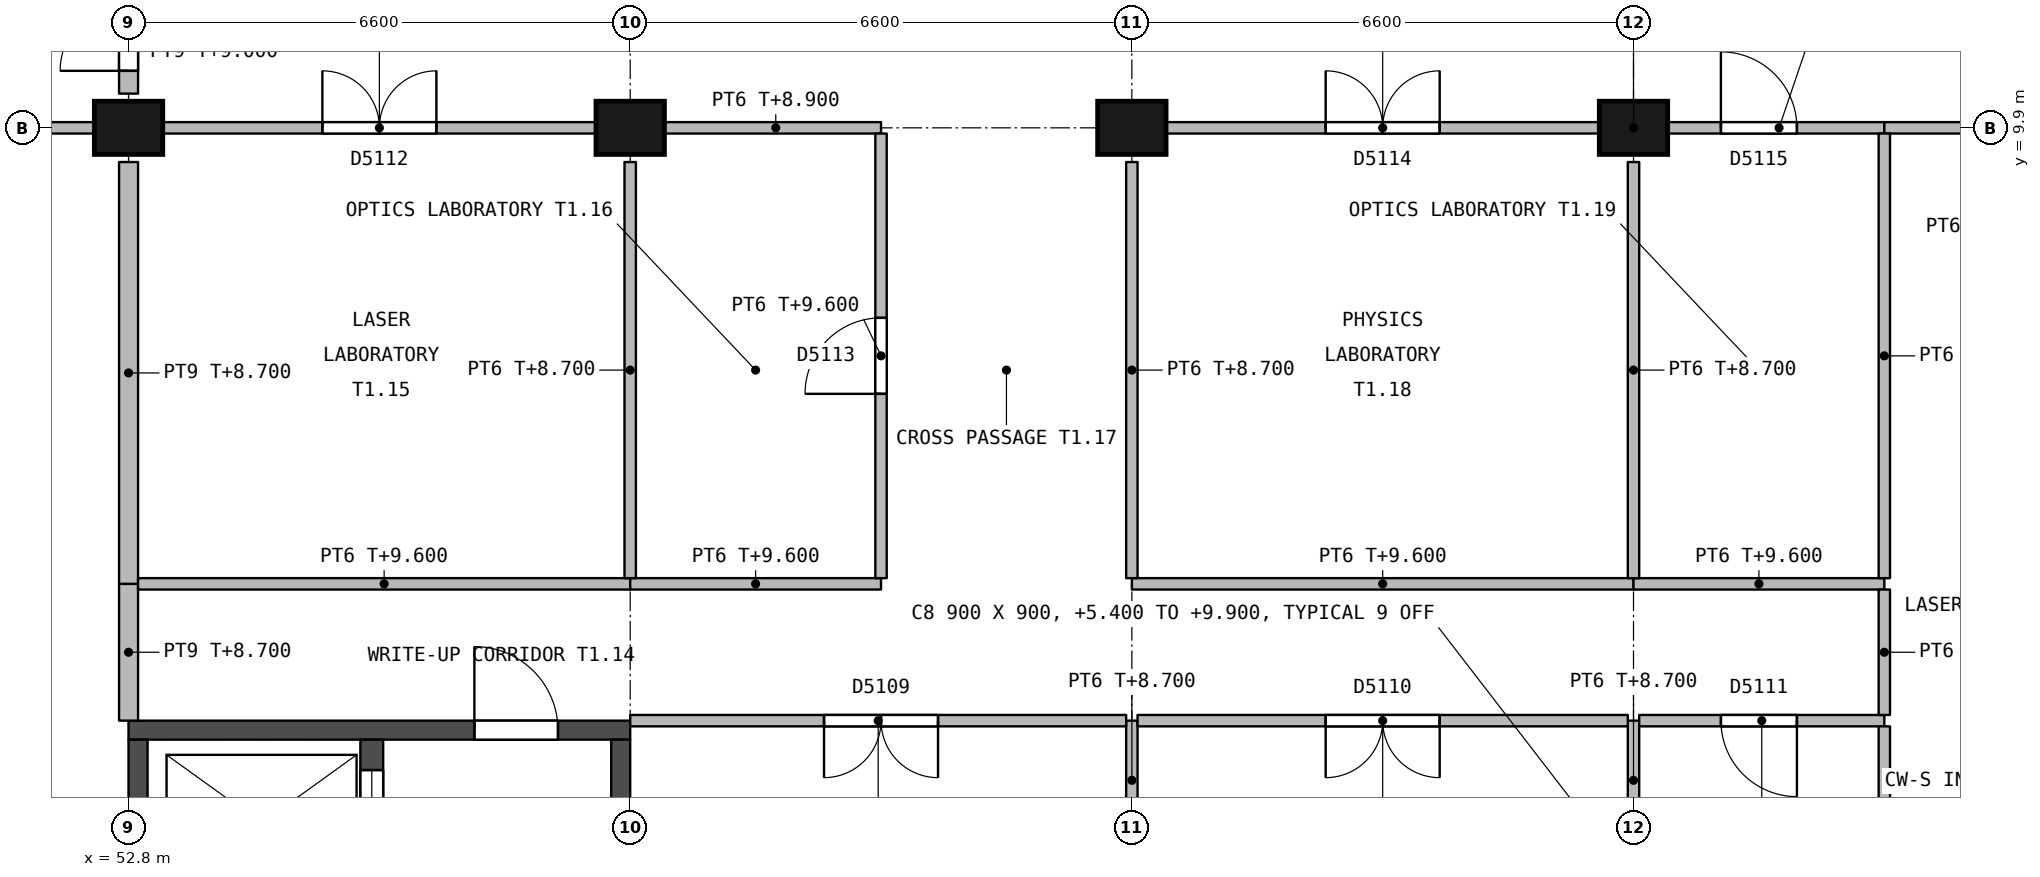
"""IFC4 building model, lengths in metres.
Left out: names, types, materials, properties, quantities, classifications, styles, units other than length and angle.
Written with IfcOpenShell. Run it as: python <this file> out.ifc"""

import sys

from ifc_helpers import new_model, si_unit, direction, frame, frame_2d, origin, origin_2d, place, context, subcontext, project, spatial, rectangle, extrude, element, fill, save


model = new_model("IFC4")
c1 = context("Model", 3, precision=1e-05, world=origin(), true_north=direction((0.0, 1.0)))
c2 = subcontext(c1, "Body", "Model", "MODEL_VIEW")
j1 = project(units=[si_unit("LENGTHUNIT", "METRE"), si_unit("PLANEANGLEUNIT", "RADIAN")], contexts=[c1])
p1 = place(None, origin())
s1 = spatial("IfcSite", under=j1, at=p1, CompositionType="ELEMENT")
p2 = place(p1, origin())
s2 = spatial("IfcBuilding", under=s1, at=p2, CompositionType="ELEMENT")
p3 = place(p2, frame((0.0, 0.0, 5.4)))
s3 = spatial("IfcBuildingStorey", under=s2, at=p3, CompositionType="ELEMENT", Elevation=5.4)
for number, where, z_axis, x_axis in (
    (1, (52.8, 9.9, 0.0), (0.0, 0.0, 1.0), (1.0, 0.0, 0.0)),
    (2, (59.4, 9.9, 0.0), (0.0, 0.0, 1.0), (1.0, 0.0, 0.0)),
    (3, (66.0, 9.9, 0.0), (0.0, 0.0, 1.0), (1.0, 0.0, 0.0)),
    (4, (72.6, 9.9, 0.0), (0.0, 0.0, 1.0), (1.0, 0.0, 0.0)),
):
    element("IfcColumn", number, at=place(p3, frame(where, z_axis=z_axis, x_axis=x_axis)), inside=s3, PredefinedType="COLUMN", context=c2, shape_type="SweptSolid", body=[
        extrude(rectangle(XDim=0.9, YDim=0.7, at=origin_2d()), origin(), (0.0, 0.0, 1.0), 4.5),
    ])
p4 = place(p3, frame((59.4, 1.975, 0.0), z_axis=(0.0, 0.0, 1.0), x_axis=(-1.0, 0.0, 0.0)))
e5 = element("IfcWall", 5, at=p4, inside=s3, PredefinedType="SHEAR", context=c2, shape_type="SweptSolid", body=[
    extrude(rectangle(XDim=6.6, YDim=0.25, at=frame_2d((3.3, 0.0))), origin(), (0.0, 0.0, 1.0), 4.2),
])
p5 = place(p4, frame((0.95, 0.0, 0.0)))
e6 = element("IfcOpeningElement", 6, at=p5, cuts=e5, PredefinedType="OPENING", context=c2, shape_type="SweptSolid", body=[
    extrude(rectangle(XDim=1.1, YDim=2.1, at=frame_2d((0.55, 1.05))), frame((0.0, 0.135, 0.0), z_axis=(0.0, -1.0, 0.0), x_axis=(1.0, 0.0, 0.0)), (0.0, 0.0, 1.0), 0.27),
])
for number, where, z_axis, x_axis in (
    (7, (59.275, 1.85, 0.0), (0.0, 0.0, 1.0), (0.0, -1.0, 0.0)),
    (8, (52.925, 1.85, 0.0), (0.0, 0.0, 1.0), (0.0, -1.0, 0.0)),
):
    element("IfcWall", number, at=place(p3, frame(where, z_axis=z_axis, x_axis=x_axis)), inside=s3, PredefinedType="SHEAR", context=c2, shape_type="SweptSolid", body=[
        extrude(rectangle(XDim=9.4, YDim=0.25, at=frame_2d((4.7, 0.0))), origin(), (0.0, 0.0, 1.0), 4.2),
    ])
p6 = place(p3, frame((56.0, 1.85, 0.0), z_axis=(0.0, 0.0, 1.0), x_axis=(0.0, -1.0, 0.0)))
e9 = element("IfcWall", 9, at=p6, inside=s3, PredefinedType="SHEAR", context=c2, shape_type="SweptSolid", body=[
    extrude(rectangle(XDim=6.35, YDim=0.3, at=frame_2d((3.175, 0.0))), origin(), (0.0, 0.0, 1.0), 4.2),
])
p7 = place(p6, frame((3.925, 0.0, 0.0)))
e10 = element("IfcOpeningElement", 10, at=p7, cuts=e9, PredefinedType="OPENING", context=c2, shape_type="SweptSolid", body=[
    extrude(rectangle(XDim=0.9, YDim=2.1, at=frame_2d((0.45, 1.05))), frame((0.0, 0.16, 0.0), z_axis=(0.0, -1.0, 0.0), x_axis=(1.0, 0.0, 0.0)), (0.0, 0.0, 1.0), 0.32),
])
p8 = place(p6, frame((0.4, 0.0, 0.0)))
e11 = element("IfcOpeningElement", 11, at=p8, cuts=e9, PredefinedType="OPENING", context=c2, shape_type="SweptSolid", body=[
    extrude(rectangle(XDim=1.4, YDim=2.4, at=frame_2d((0.7, 1.2))), frame((0.0, 0.16, 0.0), z_axis=(0.0, -1.0, 0.0), x_axis=(1.0, 0.0, 0.0)), (0.0, 0.0, 1.0), 0.32),
])
p9 = place(p3, frame((46.6, 9.9, 0.0), z_axis=(0.0, 0.0, 1.0), x_axis=(1.0, 0.0, 0.0)))
e12 = element("IfcWall", 12, at=p9, inside=s3, PredefinedType="PARTITIONING", context=c2, shape_type="SweptSolid", body=[
    extrude(rectangle(XDim=5.75, YDim=0.15, at=frame_2d((2.875, 0.0))), origin(), (0.0, 0.0, 1.0), 3.5),
])
p10 = place(p9, frame((2.15, 0.0, 0.0)))
e13 = element("IfcOpeningElement", 13, at=p10, cuts=e12, PredefinedType="OPENING", context=c2, shape_type="SweptSolid", body=[
    extrude(rectangle(XDim=1.5, YDim=2.1, at=frame_2d((0.75, 1.05))), frame((0.0, 0.085, 0.0), z_axis=(0.0, -1.0, 0.0), x_axis=(1.0, 0.0, 0.0)), (0.0, 0.0, 1.0), 0.17),
])
p11 = place(p3, frame((52.8, 10.35, 0.0), z_axis=(0.0, 0.0, 1.0), x_axis=(0.0, 1.0, 0.0)))
e14 = element("IfcWall", 14, at=p11, inside=s3, PredefinedType="PARTITIONING", context=c2, shape_type="SweptSolid", body=[
    extrude(rectangle(XDim=2.4, YDim=0.25, at=frame_2d((1.2, 0.0))), origin(), (0.0, 0.0, 1.0), 3.6),
])
p12 = place(p11, frame((0.3, 0.0, 0.0)))
e15 = element("IfcOpeningElement", 15, at=p12, cuts=e14, PredefinedType="OPENING", context=c2, shape_type="SweptSolid", body=[
    extrude(rectangle(XDim=1.8, YDim=2.1, at=frame_2d((0.9, 1.05))), frame((0.0, 0.135, 0.0), z_axis=(0.0, -1.0, 0.0), x_axis=(1.0, 0.0, 0.0)), (0.0, 0.0, 1.0), 0.27),
])
p13 = place(p3, frame((52.8, 2.1, 0.0), z_axis=(0.0, 0.0, 1.0), x_axis=(0.0, 1.0, 0.0)))
e16 = element("IfcWall", 16, at=p13, inside=s3, PredefinedType="PARTITIONING", context=c2, shape_type="SweptSolid", body=[
    extrude(rectangle(XDim=1.8, YDim=0.25, at=frame_2d((0.9, 0.0))), origin(), (0.0, 0.0, 1.0), 3.3),
])
p14 = place(p3, frame((52.8, 3.9, 0.0), z_axis=(0.0, 0.0, 1.0), x_axis=(0.0, 1.0, 0.0)))
e17 = element("IfcWall", 17, at=p14, inside=s3, PredefinedType="PARTITIONING", context=c2, shape_type="SweptSolid", body=[
    extrude(rectangle(XDim=5.55, YDim=0.25, at=frame_2d((2.775, 0.0))), origin(), (0.0, 0.0, 1.0), 3.3),
])
p15 = place(p3, frame((53.25, 9.9, 0.0), z_axis=(0.0, 0.0, 1.0), x_axis=(1.0, 0.0, 0.0)))
e18 = element("IfcWall", 18, at=p15, inside=s3, PredefinedType="PARTITIONING", context=c2, shape_type="SweptSolid", body=[
    extrude(rectangle(XDim=5.7, YDim=0.15, at=frame_2d((2.85, 0.0))), origin(), (0.0, 0.0, 1.0), 3.5),
])
p16 = place(p15, frame((2.1, 0.0, 0.0)))
e19 = element("IfcOpeningElement", 19, at=p16, cuts=e18, PredefinedType="OPENING", context=c2, shape_type="SweptSolid", body=[
    extrude(rectangle(XDim=1.5, YDim=2.1, at=frame_2d((0.75, 1.05))), frame((0.0, 0.085, 0.0), z_axis=(0.0, -1.0, 0.0), x_axis=(1.0, 0.0, 0.0)), (0.0, 0.0, 1.0), 0.17),
])
p17 = place(p3, frame((59.85, 9.9, 0.0), z_axis=(0.0, 0.0, 1.0), x_axis=(1.0, 0.0, 0.0)))
e20 = element("IfcWall", 20, at=p17, inside=s3, PredefinedType="PARTITIONING", context=c2, shape_type="SweptSolid", body=[
    extrude(rectangle(XDim=2.85, YDim=0.15, at=frame_2d((1.425, 0.0))), origin(), (0.0, 0.0, 1.0), 3.5),
])
p18 = place(p3, frame((66.45, 9.9, 0.0), z_axis=(0.0, 0.0, 1.0), x_axis=(1.0, 0.0, 0.0)))
e21 = element("IfcWall", 21, at=p18, inside=s3, PredefinedType="PARTITIONING", context=c2, shape_type="SweptSolid", body=[
    extrude(rectangle(XDim=5.7, YDim=0.15, at=frame_2d((2.85, 0.0))), origin(), (0.0, 0.0, 1.0), 3.5),
])
p19 = place(p18, frame((2.1, 0.0, 0.0)))
e22 = element("IfcOpeningElement", 22, at=p19, cuts=e21, PredefinedType="OPENING", context=c2, shape_type="SweptSolid", body=[
    extrude(rectangle(XDim=1.5, YDim=2.1, at=frame_2d((0.75, 1.05))), frame((0.0, 0.085, 0.0), z_axis=(0.0, -1.0, 0.0), x_axis=(1.0, 0.0, 0.0)), (0.0, 0.0, 1.0), 0.17),
])
p20 = place(p3, frame((73.05, 9.9, 0.0), z_axis=(0.0, 0.0, 1.0), x_axis=(1.0, 0.0, 0.0)))
e23 = element("IfcWall", 23, at=p20, inside=s3, PredefinedType="PARTITIONING", context=c2, shape_type="SweptSolid", body=[
    extrude(rectangle(XDim=2.85, YDim=0.15, at=frame_2d((1.425, 0.0))), origin(), (0.0, 0.0, 1.0), 3.5),
])
p21 = place(p20, frame((0.7, 0.0, 0.0)))
e24 = element("IfcOpeningElement", 24, at=p21, cuts=e23, PredefinedType="OPENING", context=c2, shape_type="SweptSolid", body=[
    extrude(rectangle(XDim=1.0, YDim=2.1, at=frame_2d((0.5, 1.05))), frame((0.0, 0.085, 0.0), z_axis=(0.0, -1.0, 0.0), x_axis=(1.0, 0.0, 0.0)), (0.0, 0.0, 1.0), 0.17),
])
p22 = place(p3, frame((75.9, 9.9, 0.0), z_axis=(0.0, 0.0, 1.0), x_axis=(1.0, 0.0, 0.0)))
e25 = element("IfcWall", 25, at=p22, inside=s3, PredefinedType="PARTITIONING", context=c2, shape_type="SweptSolid", body=[
    extrude(rectangle(XDim=2.85, YDim=0.15, at=frame_2d((1.425, 0.0))), origin(), (0.0, 0.0, 1.0), 3.5),
])
p23 = place(p22, frame((1.375, 0.0, 0.0)))
e26 = element("IfcOpeningElement", 26, at=p23, cuts=e25, PredefinedType="OPENING", context=c2, shape_type="SweptSolid", body=[
    extrude(rectangle(XDim=1.0, YDim=2.1, at=frame_2d((0.5, 1.05))), frame((0.0, 0.085, 0.0), z_axis=(0.0, -1.0, 0.0), x_axis=(1.0, 0.0, 0.0)), (0.0, 0.0, 1.0), 0.17),
])
p24 = place(p3, frame((66.0, 0.45, 0.0), z_axis=(0.0, 0.0, 1.0), x_axis=(0.0, 1.0, 0.0)))
e27 = element("IfcWall", 27, at=p24, inside=s3, PredefinedType="PARTITIONING", context=c2, shape_type="SweptSolid", body=[
    extrude(rectangle(XDim=1.65, YDim=0.15, at=frame_2d((0.825, 0.0))), origin(), (0.0, 0.0, 1.0), 3.3),
])
p25 = place(p3, frame((65.925, 2.1, 0.0), z_axis=(0.0, 0.0, 1.0), x_axis=(-1.0, 0.0, 0.0)))
e28 = element("IfcWall", 28, at=p25, inside=s3, PredefinedType="PARTITIONING", context=c2, shape_type="SweptSolid", body=[
    extrude(rectangle(XDim=6.525, YDim=0.15, at=frame_2d((3.262, 0.0))), origin(), (0.0, 0.0, 1.0), 4.2),
])
p26 = place(p25, frame((2.475, 0.0, 0.0)))
e29 = element("IfcOpeningElement", 29, at=p26, cuts=e28, PredefinedType="OPENING", context=c2, shape_type="SweptSolid", body=[
    extrude(rectangle(XDim=1.5, YDim=2.1, at=frame_2d((0.75, 1.05))), frame((0.0, 0.085, 0.0), z_axis=(0.0, -1.0, 0.0), x_axis=(1.0, 0.0, 0.0)), (0.0, 0.0, 1.0), 0.17),
])
p27 = place(p3, frame((72.6, 0.45, 0.0), z_axis=(0.0, 0.0, 1.0), x_axis=(0.0, 1.0, 0.0)))
e30 = element("IfcWall", 30, at=p27, inside=s3, PredefinedType="PARTITIONING", context=c2, shape_type="SweptSolid", body=[
    extrude(rectangle(XDim=1.65, YDim=0.15, at=frame_2d((0.825, 0.0))), origin(), (0.0, 0.0, 1.0), 3.3),
])
p28 = place(p3, frame((72.525, 2.1, 0.0), z_axis=(0.0, 0.0, 1.0), x_axis=(-1.0, 0.0, 0.0)))
e31 = element("IfcWall", 31, at=p28, inside=s3, PredefinedType="PARTITIONING", context=c2, shape_type="SweptSolid", body=[
    extrude(rectangle(XDim=6.45, YDim=0.15, at=frame_2d((3.225, 0.0))), origin(), (0.0, 0.0, 1.0), 4.2),
])
p29 = place(p28, frame((2.475, 0.0, 0.0)))
e32 = element("IfcOpeningElement", 32, at=p29, cuts=e31, PredefinedType="OPENING", context=c2, shape_type="SweptSolid", body=[
    extrude(rectangle(XDim=1.5, YDim=2.1, at=frame_2d((0.75, 1.05))), frame((0.0, 0.085, 0.0), z_axis=(0.0, -1.0, 0.0), x_axis=(1.0, 0.0, 0.0)), (0.0, 0.0, 1.0), 0.17),
])
p30 = place(p3, frame((75.9, 2.1, 0.0), z_axis=(0.0, 0.0, 1.0), x_axis=(-1.0, 0.0, 0.0)))
e33 = element("IfcWall", 33, at=p30, inside=s3, PredefinedType="PARTITIONING", context=c2, shape_type="SweptSolid", body=[
    extrude(rectangle(XDim=3.225, YDim=0.15, at=frame_2d((1.612, 0.0))), origin(), (0.0, 0.0, 1.0), 4.2),
])
p31 = place(p30, frame((1.15, 0.0, 0.0)))
e34 = element("IfcOpeningElement", 34, at=p31, cuts=e33, PredefinedType="OPENING", context=c2, shape_type="SweptSolid", body=[
    extrude(rectangle(XDim=1.0, YDim=2.1, at=frame_2d((0.5, 1.05))), frame((0.0, 0.085, 0.0), z_axis=(0.0, -1.0, 0.0), x_axis=(1.0, 0.0, 0.0)), (0.0, 0.0, 1.0), 0.17),
])
p32 = place(p3, frame((75.9, -8.25, 0.0), z_axis=(0.0, 0.0, 1.0), x_axis=(0.0, 1.0, 0.0)))
e35 = element("IfcWall", 35, at=p32, inside=s3, PredefinedType="PARTITIONING", context=c2, shape_type="SweptSolid", body=[
    extrude(rectangle(XDim=10.275, YDim=0.15, at=frame_2d((5.137, 0.0))), origin(), (0.0, 0.0, 1.0), 3.5),
])
p33 = place(p3, frame((59.4, 3.9, 0.0), z_axis=(0.0, 0.0, 1.0), x_axis=(-1.0, 0.0, 0.0)))
e36 = element("IfcWall", 36, at=p33, inside=s3, PredefinedType="PARTITIONING", context=c2, shape_type="SweptSolid", body=[
    extrude(rectangle(XDim=6.475, YDim=0.15, at=frame_2d((3.237, 0.0))), origin(), (0.0, 0.0, 1.0), 4.2),
])
p34 = place(p3, frame((62.7, 3.9, 0.0), z_axis=(0.0, 0.0, 1.0), x_axis=(-1.0, 0.0, 0.0)))
e37 = element("IfcWall", 37, at=p34, inside=s3, PredefinedType="PARTITIONING", context=c2, shape_type="SweptSolid", body=[
    extrude(rectangle(XDim=3.3, YDim=0.15, at=frame_2d((1.65, 0.0))), origin(), (0.0, 0.0, 1.0), 4.2),
])
p35 = place(p3, frame((72.6, 3.9, 0.0), z_axis=(0.0, 0.0, 1.0), x_axis=(-1.0, 0.0, 0.0)))
e38 = element("IfcWall", 38, at=p35, inside=s3, PredefinedType="PARTITIONING", context=c2, shape_type="SweptSolid", body=[
    extrude(rectangle(XDim=6.6, YDim=0.15, at=frame_2d((3.3, 0.0))), origin(), (0.0, 0.0, 1.0), 4.2),
])
p36 = place(p3, frame((75.9, 3.9, 0.0), z_axis=(0.0, 0.0, 1.0), x_axis=(-1.0, 0.0, 0.0)))
e39 = element("IfcWall", 39, at=p36, inside=s3, PredefinedType="PARTITIONING", context=c2, shape_type="SweptSolid", body=[
    extrude(rectangle(XDim=3.3, YDim=0.15, at=frame_2d((1.65, 0.0))), origin(), (0.0, 0.0, 1.0), 4.2),
])
p37 = place(p3, frame((75.9, 2.175, 0.0), z_axis=(0.0, 0.0, 1.0), x_axis=(0.0, 1.0, 0.0)))
e40 = element("IfcWall", 40, at=p37, inside=s3, PredefinedType="PARTITIONING", context=c2, shape_type="SweptSolid", body=[
    extrude(rectangle(XDim=1.65, YDim=0.15, at=frame_2d((0.825, 0.0))), origin(), (0.0, 0.0, 1.0), 4.2),
])
p38 = place(p3, frame((59.4, 3.975, 0.0), z_axis=(0.0, 0.0, 1.0), x_axis=(0.0, 1.0, 0.0)))
e41 = element("IfcWall", 41, at=p38, inside=s3, PredefinedType="PARTITIONING", context=c2, shape_type="SweptSolid", body=[
    extrude(rectangle(XDim=5.475, YDim=0.15, at=frame_2d((2.737, 0.0))), origin(), (0.0, 0.0, 1.0), 3.3),
])
p39 = place(p3, frame((62.7, 9.825, 0.0), z_axis=(0.0, 0.0, 1.0), x_axis=(0.0, -1.0, 0.0)))
e42 = element("IfcWall", 42, at=p39, inside=s3, PredefinedType="PARTITIONING", context=c2, shape_type="SweptSolid", body=[
    extrude(rectangle(XDim=5.85, YDim=0.15, at=frame_2d((2.925, 0.0))), origin(), (0.0, 0.0, 1.0), 4.2),
])
p40 = place(p39, frame((2.425, 0.0, 0.0)))
e43 = element("IfcOpeningElement", 43, at=p40, cuts=e42, PredefinedType="OPENING", context=c2, shape_type="SweptSolid", body=[
    extrude(rectangle(XDim=1.0, YDim=2.1, at=frame_2d((0.5, 1.05))), frame((0.0, 0.085, 0.0), z_axis=(0.0, -1.0, 0.0), x_axis=(1.0, 0.0, 0.0)), (0.0, 0.0, 1.0), 0.17),
])
for number, where, z_axis, x_axis in (
    (44, (66.0, 3.975, 0.0), (0.0, 0.0, 1.0), (0.0, 1.0, 0.0)),
    (45, (72.6, 3.975, 0.0), (0.0, 0.0, 1.0), (0.0, 1.0, 0.0)),
):
    element("IfcWall", number, at=place(p3, frame(where, z_axis=z_axis, x_axis=x_axis)), inside=s3, PredefinedType="PARTITIONING", context=c2, shape_type="SweptSolid", body=[
        extrude(rectangle(XDim=5.475, YDim=0.15, at=frame_2d((2.737, 0.0))), origin(), (0.0, 0.0, 1.0), 3.3),
    ])
p41 = place(p3, frame((75.9, 3.975, 0.0), z_axis=(0.0, 0.0, 1.0), x_axis=(0.0, 1.0, 0.0)))
e46 = element("IfcWall", 46, at=p41, inside=s3, PredefinedType="PARTITIONING", context=c2, shape_type="SweptSolid", body=[
    extrude(rectangle(XDim=5.85, YDim=0.15, at=frame_2d((2.925, 0.0))), origin(), (0.0, 0.0, 1.0), 4.2),
])
p42 = place(p5, origin())
e47 = element("IfcDoor", 47, at=p42, inside=s3, OperationType="SINGLE_SWING_RIGHT", PredefinedType="DOOR", context=c2, shape_type="SweptSolid", body=[
    extrude(rectangle(XDim=1.1, YDim=2.1, at=frame_2d((0.55, 1.05))), frame((0.0, 0.025, 0.0), z_axis=(0.0, -1.0, 0.0), x_axis=(1.0, 0.0, 0.0)), (0.0, 0.0, 1.0), 0.05),
])
fill(e6, e47)
p43 = place(p8, origin())
e48 = element("IfcDoor", 48, at=p43, inside=s3, OperationType="DOUBLE_DOOR_SLIDING", PredefinedType="NOTDEFINED", context=c2, shape_type="SweptSolid", body=[
    extrude(rectangle(XDim=1.4, YDim=2.4, at=frame_2d((0.7, 1.2))), frame((0.0, 0.025, 0.0), z_axis=(0.0, -1.0, 0.0), x_axis=(1.0, 0.0, 0.0)), (0.0, 0.0, 1.0), 0.05),
])
fill(e11, e48)
p44 = place(p12, origin())
e49 = element("IfcDoor", 49, at=p44, inside=s3, OperationType="DOUBLE_DOOR_SINGLE_SWING", PredefinedType="DOOR", context=c2, shape_type="SweptSolid", body=[
    extrude(rectangle(XDim=1.8, YDim=2.1, at=frame_2d((0.9, 1.05))), frame((0.0, 0.03, 0.0), z_axis=(0.0, -1.0, 0.0), x_axis=(1.0, 0.0, 0.0)), (0.0, 0.0, 1.0), 0.06),
])
fill(e15, e49)
p45 = place(p26, origin())
e50 = element("IfcDoor", 50, at=p45, inside=s3, OperationType="DOUBLE_DOOR_SINGLE_SWING", PredefinedType="DOOR", context=c2, shape_type="SweptSolid", body=[
    extrude(rectangle(XDim=1.5, YDim=2.1, at=frame_2d((0.75, 1.05))), frame((0.0, 0.027, 0.0), z_axis=(0.0, -1.0, 0.0), x_axis=(1.0, 0.0, 0.0)), (0.0, 0.0, 1.0), 0.054),
])
fill(e29, e50)
p46 = place(p29, origin())
e51 = element("IfcDoor", 51, at=p46, inside=s3, OperationType="DOUBLE_DOOR_SINGLE_SWING", PredefinedType="DOOR", context=c2, shape_type="SweptSolid", body=[
    extrude(rectangle(XDim=1.5, YDim=2.1, at=frame_2d((0.75, 1.05))), frame((0.0, 0.027, 0.0), z_axis=(0.0, -1.0, 0.0), x_axis=(1.0, 0.0, 0.0)), (0.0, 0.0, 1.0), 0.054),
])
fill(e32, e51)
p47 = place(p31, origin())
e52 = element("IfcDoor", 52, at=p47, inside=s3, OperationType="SINGLE_SWING_LEFT", PredefinedType="DOOR", context=c2, shape_type="SweptSolid", body=[
    extrude(rectangle(XDim=1.0, YDim=2.1, at=frame_2d((0.5, 1.05))), frame((0.0, 0.027, 0.0), z_axis=(0.0, -1.0, 0.0), x_axis=(1.0, 0.0, 0.0)), (0.0, 0.0, 1.0), 0.054),
])
fill(e34, e52)
p48 = place(p16, origin())
e53 = element("IfcDoor", 53, at=p48, inside=s3, OperationType="DOUBLE_DOOR_SINGLE_SWING", PredefinedType="DOOR", context=c2, shape_type="SweptSolid", body=[
    extrude(rectangle(XDim=1.5, YDim=2.1, at=frame_2d((0.75, 1.05))), frame((0.0, 0.027, 0.0), z_axis=(0.0, -1.0, 0.0), x_axis=(1.0, 0.0, 0.0)), (0.0, 0.0, 1.0), 0.054),
])
fill(e19, e53)
p49 = place(p40, origin())
e54 = element("IfcDoor", 54, at=p49, inside=s3, OperationType="SINGLE_SWING_RIGHT", PredefinedType="DOOR", context=c2, shape_type="SweptSolid", body=[
    extrude(rectangle(XDim=1.0, YDim=2.1, at=frame_2d((0.5, 1.05))), frame((0.0, 0.027, 0.0), z_axis=(0.0, -1.0, 0.0), x_axis=(1.0, 0.0, 0.0)), (0.0, 0.0, 1.0), 0.054),
])
fill(e43, e54)
p50 = place(p19, origin())
e55 = element("IfcDoor", 55, at=p50, inside=s3, OperationType="DOUBLE_DOOR_SINGLE_SWING", PredefinedType="DOOR", context=c2, shape_type="SweptSolid", body=[
    extrude(rectangle(XDim=1.5, YDim=2.1, at=frame_2d((0.75, 1.05))), frame((0.0, 0.027, 0.0), z_axis=(0.0, -1.0, 0.0), x_axis=(1.0, 0.0, 0.0)), (0.0, 0.0, 1.0), 0.054),
])
fill(e22, e55)
p51 = place(p21, origin())
e56 = element("IfcDoor", 56, at=p51, inside=s3, OperationType="SINGLE_SWING_LEFT", PredefinedType="DOOR", context=c2, shape_type="SweptSolid", body=[
    extrude(rectangle(XDim=1.0, YDim=2.1, at=frame_2d((0.5, 1.05))), frame((0.0, 0.027, 0.0), z_axis=(0.0, -1.0, 0.0), x_axis=(1.0, 0.0, 0.0)), (0.0, 0.0, 1.0), 0.054),
])
fill(e24, e56)
save(model, sys.argv[1])
